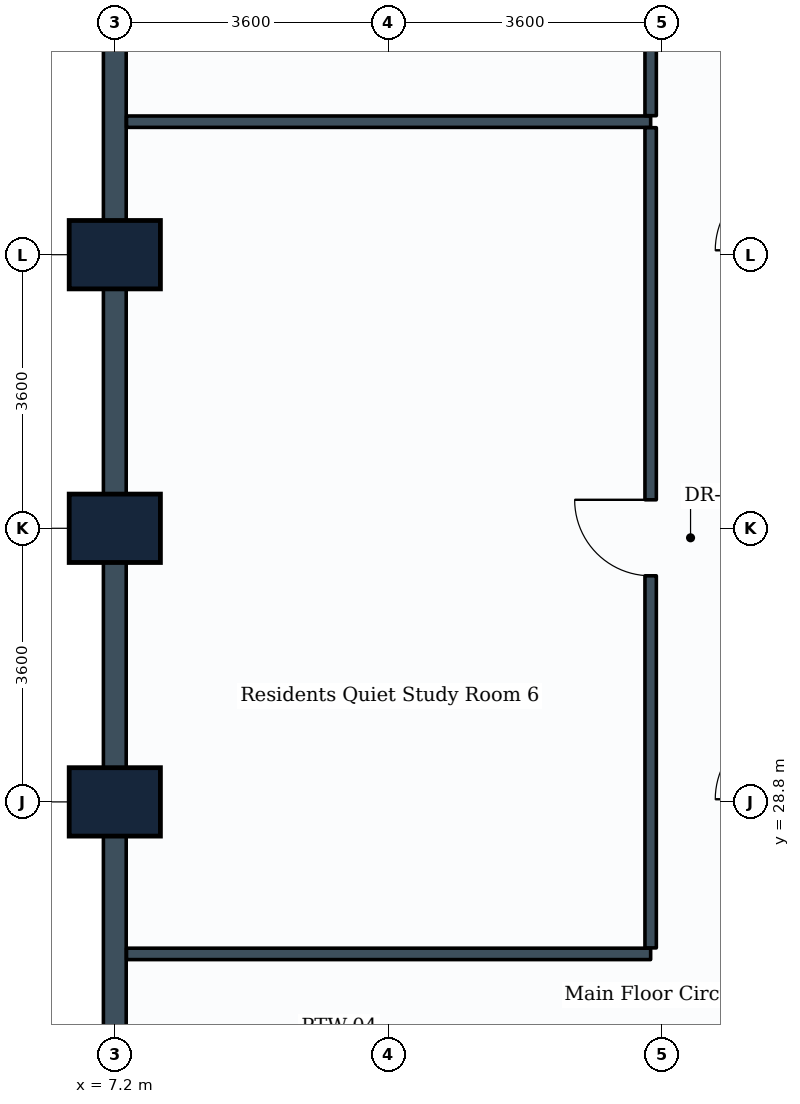
"""IFC4 building model, lengths in metres.
Left out: names, types, materials, properties, quantities, classifications, styles, units other than length and angle.
Written with IfcOpenShell. Run it as: python <this file> out.ifc"""

import sys

from ifc_helpers import new_model, si_unit, direction, frame, frame_2d, origin, origin_2d, place, context, subcontext, project, spatial, rectangle, extrude, element, fill, save


model = new_model("IFC4")
c1 = context("Model", 3, precision=1e-05, world=origin(), true_north=direction((0.0, 1.0)))
c2 = subcontext(c1, "Body", "Model", "MODEL_VIEW")
j1 = project(units=[si_unit("LENGTHUNIT", "METRE"), si_unit("PLANEANGLEUNIT", "RADIAN")], contexts=[c1])
p1 = place(None, origin())
s1 = spatial("IfcSite", under=j1, at=p1, CompositionType="ELEMENT")
p2 = place(p1, origin())
s2 = spatial("IfcBuilding", under=s1, at=p2, CompositionType="ELEMENT")
p3 = place(p2, frame((0.0, 0.0, 59.1)))
s3 = spatial("IfcBuildingStorey", under=s2, at=p3, CompositionType="ELEMENT", Elevation=59.1)
for number, where, z_axis, x_axis in (
    (1, (7.2, 28.8, 0.0), (0.0, 0.0, 1.0), (0.0, 1.0, 0.0)),
    (2, (7.2, 32.4, 0.0), (0.0, 0.0, 1.0), (0.0, 1.0, 0.0)),
    (3, (7.2, 36.0, 0.0), (0.0, 0.0, 1.0), (0.0, 1.0, 0.0)),
):
    element("IfcColumn", number, at=place(p3, frame(where, z_axis=z_axis, x_axis=x_axis)), inside=s3, PredefinedType="COLUMN", context=c2, shape_type="SweptSolid", body=[
        extrude(rectangle(XDim=0.9, YDim=1.2, at=origin_2d()), origin(), (0.0, 0.0, 1.0), 3.9),
    ])
for number, where, z_axis, x_axis in (
    (4, (7.2, 36.0, 0.0), (0.0, 0.0, 1.0), (0.0, 1.0, 0.0)),
    (5, (7.2, 32.4, 0.0), (0.0, 0.0, 1.0), (0.0, 1.0, 0.0)),
):
    element("IfcWall", number, at=place(p3, frame(where, z_axis=z_axis, x_axis=x_axis)), inside=s3, PredefinedType="STANDARD", context=c2, shape_type="SweptSolid", body=[
        extrude(rectangle(XDim=3.6, YDim=0.3, at=frame_2d((1.8, 0.0))), origin(), (0.0, 0.0, 1.0), 2.93),
    ])
p4 = place(p3, frame((7.2, 28.8, 0.0), z_axis=(0.0, 0.0, 1.0), x_axis=(0.0, 1.0, 0.0)))
e6 = element("IfcWall", 6, at=p4, inside=s3, PredefinedType="STANDARD", context=c2, shape_type="SweptSolid", body=[
    extrude(rectangle(XDim=3.6, YDim=0.3, at=frame_2d((1.8, 0.0))), origin(), (0.0, 0.0, 1.0), 2.93),
])
p5 = place(p3, frame((7.2, 25.2, 0.0), z_axis=(0.0, 0.0, 1.0), x_axis=(0.0, 1.0, 0.0)))
e7 = element("IfcWall", 7, at=p5, inside=s3, PredefinedType="STANDARD", context=c2, shape_type="SweptSolid", body=[
    extrude(rectangle(XDim=3.6, YDim=0.3, at=frame_2d((1.8, 0.0))), origin(), (0.0, 0.0, 1.0), 2.93),
])
for number, where, z_axis, x_axis in (
    (8, (7.354, 26.8, 0.0), (0.0, 0.0, 1.0), (1.0, 0.0, 0.0)),
    (9, (7.354, 37.75, 0.0), (0.0, 0.0, 1.0), (1.0, 0.0, 0.0)),
):
    element("IfcWall", number, at=place(p3, frame(where, z_axis=z_axis, x_axis=x_axis)), inside=s3, PredefinedType="PARTITIONING", context=c2, shape_type="SweptSolid", body=[
        extrude(rectangle(XDim=6.896, YDim=0.15, at=frame_2d((3.448, 0.0))), origin(), (0.0, 0.0, 1.0), 2.93),
    ])
p6 = place(p3, frame((14.25, 26.879, 0.0), z_axis=(0.0, 0.0, 1.0), x_axis=(0.0, 1.0, 0.0)))
e10 = element("IfcWall", 10, at=p6, inside=s3, PredefinedType="PARTITIONING", context=c2, shape_type="SweptSolid", body=[
    extrude(rectangle(XDim=10.792, YDim=0.15, at=frame_2d((5.396, 0.0))), origin(), (0.0, 0.0, 1.0), 3.03),
])
p7 = place(p6, frame((4.896, 0.0, 0.0)))
e11 = element("IfcOpeningElement", 11, at=p7, cuts=e10, PredefinedType="OPENING", context=c2, shape_type="SweptSolid", body=[
    extrude(rectangle(XDim=1.0, YDim=2.1, at=frame_2d((0.5, 1.05))), frame((0.0, 0.085, 0.0), z_axis=(0.0, -1.0, 0.0), x_axis=(1.0, 0.0, 0.0)), (0.0, 0.0, 1.0), 0.17),
])
p8 = place(p3, frame((14.25, 37.829, 0.0), z_axis=(0.0, 0.0, 1.0), x_axis=(0.0, 1.0, 0.0)))
e12 = element("IfcWall", 12, at=p8, inside=s3, PredefinedType="PARTITIONING", context=c2, shape_type="SweptSolid", body=[
    extrude(rectangle(XDim=12.417, YDim=0.15, at=frame_2d((6.208, 0.0))), origin(), (0.0, 0.0, 1.0), 2.93),
])
p9 = place(p8, frame((5.706, 0.0, 0.0)))
e13 = element("IfcOpeningElement", 13, at=p9, cuts=e12, PredefinedType="OPENING", context=c2, shape_type="SweptSolid", body=[
    extrude(rectangle(XDim=1.0, YDim=2.1, at=frame_2d((0.5, 1.05))), frame((0.0, 0.085, 0.0), z_axis=(0.0, -1.0, 0.0), x_axis=(1.0, 0.0, 0.0)), (0.0, 0.0, 1.0), 0.17),
])
p10 = place(p7, origin())
e14 = element("IfcDoor", 14, at=p10, inside=s3, OperationType="SINGLE_SWING_RIGHT", PredefinedType="DOOR", context=c2, shape_type="SweptSolid", body=[
    extrude(rectangle(XDim=1.0, YDim=2.1, at=frame_2d((0.5, 1.05))), frame((0.0, 0.025, 0.0), z_axis=(0.0, -1.0, 0.0), x_axis=(1.0, 0.0, 0.0)), (0.0, 0.0, 1.0), 0.05),
])
fill(e11, e14)
save(model, sys.argv[1])
